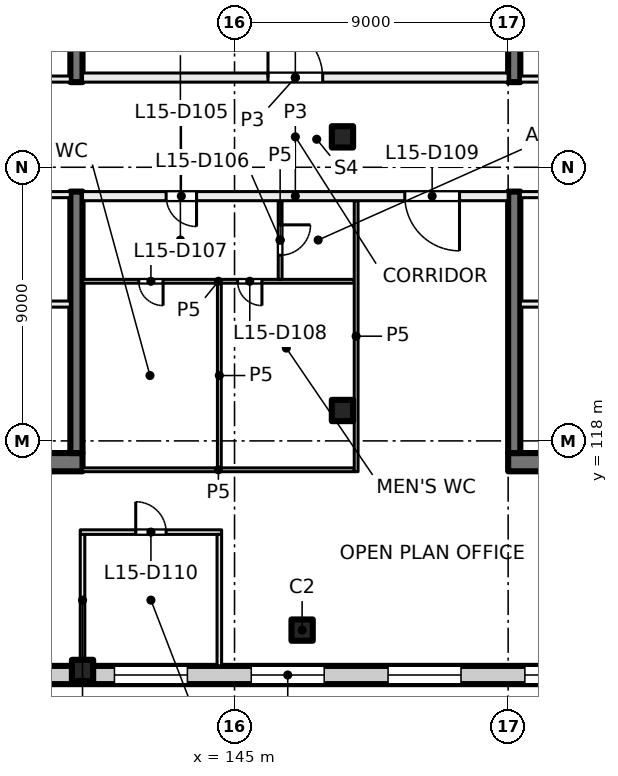
"""IFC4 building model, lengths in metres.
Left out: names, types, materials, properties, quantities, classifications, styles, units other than length and angle.
Written with IfcOpenShell. Run it as: python <this file> out.ifc"""

import sys

from ifc_helpers import new_model, si_unit, direction, frame, frame_2d, origin, origin_2d, place, context, subcontext, project, spatial, rectangle, extrude, element, fill, save


model = new_model("IFC4")
c1 = context("Model", 3, precision=1e-05, world=origin(), true_north=direction((0.0, 1.0)))
c2 = subcontext(c1, "Body", "Model", "MODEL_VIEW")
j1 = project(units=[si_unit("LENGTHUNIT", "METRE"), si_unit("PLANEANGLEUNIT", "RADIAN")], contexts=[c1])
p1 = place(None, origin())
s1 = spatial("IfcSite", under=j1, at=p1, CompositionType="ELEMENT")
p2 = place(p1, origin())
s2 = spatial("IfcBuilding", under=s1, at=p2, CompositionType="ELEMENT")
p3 = place(p2, frame((0.0, 0.0, 67.5)))
s3 = spatial("IfcBuildingStorey", under=s2, at=p3, CompositionType="ELEMENT", Elevation=67.5)
for number, where, z_axis, x_axis in (
    (1, (148.55, 119.0, 0.0), (0.0, 0.0, 1.0), (1.0, 0.0, 0.0)),
    (2, (148.55, 128.0, 0.0), (0.0, 0.0, 1.0), (1.0, 0.0, 0.0)),
    (3, (140.0, 110.45, 0.0), (0.0, 0.0, 1.0), (1.0, 0.0, 0.0)),
    (4, (147.223, 111.777, 0.0), (0.0, 0.0, 1.0), (1.0, 0.0, 0.0)),
):
    element("IfcColumn", number, at=place(p3, frame(where, z_axis=z_axis, x_axis=x_axis)), inside=s3, PredefinedType="COLUMN", context=c2, shape_type="SweptSolid", body=[
        extrude(rectangle(XDim=0.7, YDim=0.7, at=origin_2d()), origin(), (0.0, 0.0, 1.0), 4.0),
    ])
p4 = place(p3, frame((135.4, 117.3, 0.0), z_axis=(0.0, 0.0, 1.0), x_axis=(1.0, 0.0, 0.0)))
e5 = element("IfcWall", 5, at=p4, inside=s3, PredefinedType="SHEAR", context=c2, shape_type="SweptSolid", body=[
    extrude(rectangle(XDim=4.6, YDim=0.6, at=frame_2d((2.3, 0.0))), origin(), (0.0, 0.0, 1.0), 4.0),
])
for number, where, z_axis, x_axis in (
    (6, (139.8, 117.6, 0.0), (0.0, 0.0, 1.0), (0.0, 1.0, 0.0)),
    (7, (139.8, 129.8, 0.0), (0.0, 0.0, 1.0), (0.0, 1.0, 0.0)),
):
    element("IfcWall", number, at=place(p3, frame(where, z_axis=z_axis, x_axis=x_axis)), inside=s3, PredefinedType="SHEAR", context=c2, shape_type="SweptSolid", body=[
        extrude(rectangle(XDim=8.6, YDim=0.4, at=frame_2d((4.3, 0.0))), origin(), (0.0, 0.0, 1.0), 4.0),
    ])
p5 = place(p3, frame((158.6, 117.3, 0.0), z_axis=(0.0, 0.0, 1.0), x_axis=(-1.0, 0.0, 0.0)))
e8 = element("IfcWall", 8, at=p5, inside=s3, PredefinedType="SHEAR", context=c2, shape_type="SweptSolid", body=[
    extrude(rectangle(XDim=4.6, YDim=0.6, at=frame_2d((2.3, 0.0))), origin(), (0.0, 0.0, 1.0), 4.0),
])
for number, where, z_axis, x_axis in (
    (9, (154.2, 138.4, 0.0), (0.0, 0.0, 1.0), (0.0, -1.0, 0.0)),
    (10, (154.2, 126.2, 0.0), (0.0, 0.0, 1.0), (0.0, -1.0, 0.0)),
):
    element("IfcWall", number, at=place(p3, frame(where, z_axis=z_axis, x_axis=x_axis)), inside=s3, PredefinedType="SHEAR", context=c2, shape_type="SweptSolid", body=[
        extrude(rectangle(XDim=8.6, YDim=0.4, at=frame_2d((4.3, 0.0))), origin(), (0.0, 0.0, 1.0), 4.0),
    ])
p6 = place(p3, frame((162.93, 110.3, 0.0), z_axis=(0.0, 0.0, 1.0), x_axis=(-1.0, 0.0, 0.0)))
e11 = element("IfcWall", 11, at=p6, inside=s3, PredefinedType="SOLIDWALL", context=c2, shape_type="SweptSolid", body=[
    extrude(rectangle(XDim=31.93, YDim=0.6, at=frame_2d((15.965, 0.0))), origin(), (0.0, 0.0, 1.0), 3.625),
])
p7 = place(p6, frame((1.48, 0.0, 0.9)))
e12 = element("IfcOpeningElement", 12, at=p7, cuts=e11, PredefinedType="OPENING", context=c2, shape_type="SweptSolid", body=[
    extrude(rectangle(XDim=2.4, YDim=2.4, at=frame_2d((1.2, 1.2))), frame((0.0, 0.31, 0.0), z_axis=(0.0, -1.0, 0.0), x_axis=(1.0, 0.0, 0.0)), (0.0, 0.0, 1.0), 0.62),
])
p8 = place(p6, frame((5.98, 0.0, 0.9)))
e13 = element("IfcOpeningElement", 13, at=p8, cuts=e11, PredefinedType="OPENING", context=c2, shape_type="SweptSolid", body=[
    extrude(rectangle(XDim=2.4, YDim=2.4, at=frame_2d((1.2, 1.2))), frame((0.0, 0.31, 0.0), z_axis=(0.0, -1.0, 0.0), x_axis=(1.0, 0.0, 0.0)), (0.0, 0.0, 1.0), 0.62),
])
p9 = place(p6, frame((10.48, 0.0, 0.9)))
e14 = element("IfcOpeningElement", 14, at=p9, cuts=e11, PredefinedType="OPENING", context=c2, shape_type="SweptSolid", body=[
    extrude(rectangle(XDim=2.4, YDim=2.4, at=frame_2d((1.2, 1.2))), frame((0.0, 0.31, 0.0), z_axis=(0.0, -1.0, 0.0), x_axis=(1.0, 0.0, 0.0)), (0.0, 0.0, 1.0), 0.62),
])
p10 = place(p6, frame((14.98, 0.0, 0.9)))
e15 = element("IfcOpeningElement", 15, at=p10, cuts=e11, PredefinedType="OPENING", context=c2, shape_type="SweptSolid", body=[
    extrude(rectangle(XDim=2.4, YDim=2.4, at=frame_2d((1.2, 1.2))), frame((0.0, 0.31, 0.0), z_axis=(0.0, -1.0, 0.0), x_axis=(1.0, 0.0, 0.0)), (0.0, 0.0, 1.0), 0.62),
])
p11 = place(p6, frame((19.48, 0.0, 0.9)))
e16 = element("IfcOpeningElement", 16, at=p11, cuts=e11, PredefinedType="OPENING", context=c2, shape_type="SweptSolid", body=[
    extrude(rectangle(XDim=2.4, YDim=2.4, at=frame_2d((1.2, 1.2))), frame((0.0, 0.31, 0.0), z_axis=(0.0, -1.0, 0.0), x_axis=(1.0, 0.0, 0.0)), (0.0, 0.0, 1.0), 0.62),
])
p12 = place(p6, frame((23.98, 0.0, 0.9)))
e17 = element("IfcOpeningElement", 17, at=p12, cuts=e11, PredefinedType="OPENING", context=c2, shape_type="SweptSolid", body=[
    extrude(rectangle(XDim=2.4, YDim=2.4, at=frame_2d((1.2, 1.2))), frame((0.0, 0.31, 0.0), z_axis=(0.0, -1.0, 0.0), x_axis=(1.0, 0.0, 0.0)), (0.0, 0.0, 1.0), 0.62),
])
p13 = place(p6, frame((28.48, 0.0, 0.9)))
e18 = element("IfcOpeningElement", 18, at=p13, cuts=e11, PredefinedType="OPENING", context=c2, shape_type="SweptSolid", body=[
    extrude(rectangle(XDim=2.4, YDim=2.4, at=frame_2d((1.2, 1.2))), frame((0.0, 0.31, 0.0), z_axis=(0.0, -1.0, 0.0), x_axis=(1.0, 0.0, 0.0)), (0.0, 0.0, 1.0), 0.62),
])
p14 = place(p3, frame((135.0, 129.9, 0.0), z_axis=(0.0, 0.0, 1.0), x_axis=(1.0, 0.0, 0.0)))
e19 = element("IfcWall", 19, at=p14, inside=s3, PredefinedType="PARTITIONING", context=c2, shape_type="SweptSolid", body=[
    extrude(rectangle(XDim=4.6, YDim=0.2, at=frame_2d((2.3, 0.0))), origin(), (0.0, 0.0, 1.0), 3.625),
])
p15 = place(p14, frame((1.7, 0.0, 0.0)))
e20 = element("IfcOpeningElement", 20, at=p15, cuts=e19, PredefinedType="OPENING", context=c2, shape_type="SweptSolid", body=[
    extrude(rectangle(XDim=1.2, YDim=2.1, at=frame_2d((0.6, 1.05))), frame((0.0, 0.11, 0.0), z_axis=(0.0, -1.0, 0.0), x_axis=(1.0, 0.0, 0.0)), (0.0, 0.0, 1.0), 0.22),
])
p16 = place(p3, frame((139.6, 126.1, 0.0), z_axis=(0.0, 0.0, 1.0), x_axis=(-1.0, 0.0, 0.0)))
e21 = element("IfcWall", 21, at=p16, inside=s3, PredefinedType="PARTITIONING", context=c2, shape_type="SweptSolid", body=[
    extrude(rectangle(XDim=4.6, YDim=0.2, at=frame_2d((2.3, 0.0))), origin(), (0.0, 0.0, 1.0), 3.625),
])
p17 = place(p16, frame((1.7, 0.0, 0.0)))
e22 = element("IfcOpeningElement", 22, at=p17, cuts=e21, PredefinedType="OPENING", context=c2, shape_type="SweptSolid", body=[
    extrude(rectangle(XDim=1.2, YDim=2.1, at=frame_2d((0.6, 1.05))), frame((0.0, 0.11, 0.0), z_axis=(0.0, -1.0, 0.0), x_axis=(1.0, 0.0, 0.0)), (0.0, 0.0, 1.0), 0.22),
])
p18 = place(p3, frame((139.6, 122.5, 0.0), z_axis=(0.0, 0.0, 1.0), x_axis=(-1.0, 0.0, 0.0)))
e23 = element("IfcWall", 23, at=p18, inside=s3, PredefinedType="PARTITIONING", context=c2, shape_type="SweptSolid", body=[
    extrude(rectangle(XDim=4.6, YDim=0.2, at=frame_2d((2.3, 0.0))), origin(), (0.0, 0.0, 1.0), 3.625),
])
p19 = place(p18, frame((1.35, 0.0, 0.0)))
e24 = element("IfcOpeningElement", 24, at=p19, cuts=e23, PredefinedType="OPENING", context=c2, shape_type="SweptSolid", body=[
    extrude(rectangle(XDim=1.5, YDim=2.1, at=frame_2d((0.75, 1.05))), frame((0.0, 0.11, 0.0), z_axis=(0.0, -1.0, 0.0), x_axis=(1.0, 0.0, 0.0)), (0.0, 0.0, 1.0), 0.22),
])
p20 = place(p3, frame((163.8, 126.1, 0.0), z_axis=(0.0, 0.0, 1.0), x_axis=(-1.0, 0.0, 0.0)))
e25 = element("IfcWall", 25, at=p20, inside=s3, PredefinedType="PARTITIONING", context=c2, shape_type="SweptSolid", body=[
    extrude(rectangle(XDim=9.4, YDim=0.2, at=frame_2d((4.7, 0.0))), origin(), (0.0, 0.0, 1.0), 3.625),
])
p21 = place(p20, frame((4.1, 0.0, 0.0)))
e26 = element("IfcOpeningElement", 26, at=p21, cuts=e25, PredefinedType="OPENING", context=c2, shape_type="SweptSolid", body=[
    extrude(rectangle(XDim=1.2, YDim=2.1, at=frame_2d((0.6, 1.05))), frame((0.0, 0.11, 0.0), z_axis=(0.0, -1.0, 0.0), x_axis=(1.0, 0.0, 0.0)), (0.0, 0.0, 1.0), 0.22),
])
p22 = place(p3, frame((163.8, 122.5, 0.0), z_axis=(0.0, 0.0, 1.0), x_axis=(-1.0, 0.0, 0.0)))
e27 = element("IfcWall", 27, at=p22, inside=s3, PredefinedType="PARTITIONING", context=c2, shape_type="SweptSolid", body=[
    extrude(rectangle(XDim=9.4, YDim=0.2, at=frame_2d((4.7, 0.0))), origin(), (0.0, 0.0, 1.0), 3.625),
])
p23 = place(p22, frame((6.55, 0.0, 0.0)))
e28 = element("IfcOpeningElement", 28, at=p23, cuts=e27, PredefinedType="OPENING", context=c2, shape_type="SweptSolid", body=[
    extrude(rectangle(XDim=1.5, YDim=2.1, at=frame_2d((0.75, 1.05))), frame((0.0, 0.11, 0.0), z_axis=(0.0, -1.0, 0.0), x_axis=(1.0, 0.0, 0.0)), (0.0, 0.0, 1.0), 0.22),
])
p24 = place(p3, frame((154.4, 129.9, 0.0), z_axis=(0.0, 0.0, 1.0), x_axis=(1.0, 0.0, 0.0)))
e29 = element("IfcWall", 29, at=p24, inside=s3, PredefinedType="PARTITIONING", context=c2, shape_type="SweptSolid", body=[
    extrude(rectangle(XDim=9.4, YDim=0.2, at=frame_2d((4.7, 0.0))), origin(), (0.0, 0.0, 1.0), 3.625),
])
p25 = place(p24, frame((4.1, 0.0, 0.0)))
e30 = element("IfcOpeningElement", 30, at=p25, cuts=e29, PredefinedType="OPENING", context=c2, shape_type="SweptSolid", body=[
    extrude(rectangle(XDim=1.2, YDim=2.1, at=frame_2d((0.6, 1.05))), frame((0.0, 0.11, 0.0), z_axis=(0.0, -1.0, 0.0), x_axis=(1.0, 0.0, 0.0)), (0.0, 0.0, 1.0), 0.22),
])
p26 = place(p3, frame((140.0, 110.6, 0.0), z_axis=(0.0, 0.0, 1.0), x_axis=(0.0, 1.0, 0.0)))
e31 = element("IfcWall", 31, at=p26, inside=s3, PredefinedType="PARTITIONING", context=c2, shape_type="SweptSolid", body=[
    extrude(rectangle(XDim=4.325, YDim=0.15, at=frame_2d((2.163, 0.0))), origin(), (0.0, 0.0, 1.0), 3.625),
])
p27 = place(p3, frame((139.925, 115.0, 0.0), z_axis=(0.0, 0.0, 1.0), x_axis=(1.0, 0.0, 0.0)))
e32 = element("IfcWall", 32, at=p27, inside=s3, PredefinedType="PARTITIONING", context=c2, shape_type="SweptSolid", body=[
    extrude(rectangle(XDim=4.65, YDim=0.15, at=frame_2d((2.325, 0.0))), origin(), (0.0, 0.0, 1.0), 3.625),
])
p28 = place(p27, frame((1.825, 0.0, 0.0)))
e33 = element("IfcOpeningElement", 33, at=p28, cuts=e32, PredefinedType="OPENING", context=c2, shape_type="SweptSolid", body=[
    extrude(rectangle(XDim=1.0, YDim=2.1, at=frame_2d((0.5, 1.05))), frame((0.0, 0.085, 0.0), z_axis=(0.0, -1.0, 0.0), x_axis=(1.0, 0.0, 0.0)), (0.0, 0.0, 1.0), 0.17),
])
p29 = place(p3, frame((140.0, 117.05, 0.0), z_axis=(0.0, 0.0, 1.0), x_axis=(1.0, 0.0, 0.0)))
e34 = element("IfcWall", 34, at=p29, inside=s3, PredefinedType="PARTITIONING", context=c2, shape_type="SweptSolid", body=[
    extrude(rectangle(XDim=8.938, YDim=0.125, at=frame_2d((4.469, 0.0))), origin(), (0.0, 0.0, 1.0), 3.625),
])
p30 = place(p3, frame((148.938, 123.25, 0.0), z_axis=(0.0, 0.0, 1.0), x_axis=(-1.0, 0.0, 0.0)))
e35 = element("IfcWall", 35, at=p30, inside=s3, PredefinedType="PARTITIONING", context=c2, shape_type="SweptSolid", body=[
    extrude(rectangle(XDim=8.938, YDim=0.125, at=frame_2d((4.469, 0.0))), origin(), (0.0, 0.0, 1.0), 3.625),
])
p31 = place(p30, frame((6.288, 0.0, 0.0)))
e36 = element("IfcOpeningElement", 36, at=p31, cuts=e35, PredefinedType="OPENING", context=c2, shape_type="SweptSolid", body=[
    extrude(rectangle(XDim=0.8, YDim=2.1, at=frame_2d((0.4, 1.05))), frame((0.0, 0.073, 0.0), z_axis=(0.0, -1.0, 0.0), x_axis=(1.0, 0.0, 0.0)), (0.0, 0.0, 1.0), 0.145),
])
p32 = place(p30, frame((3.037, 0.0, 0.0)))
e37 = element("IfcOpeningElement", 37, at=p32, cuts=e35, PredefinedType="OPENING", context=c2, shape_type="SweptSolid", body=[
    extrude(rectangle(XDim=0.8, YDim=2.1, at=frame_2d((0.4, 1.05))), frame((0.0, 0.073, 0.0), z_axis=(0.0, -1.0, 0.0), x_axis=(1.0, 0.0, 0.0)), (0.0, 0.0, 1.0), 0.145),
])
p33 = place(p3, frame((140.0, 129.95, 0.0), z_axis=(0.0, 0.0, 1.0), x_axis=(1.0, 0.0, 0.0)))
e38 = element("IfcWall", 38, at=p33, inside=s3, PredefinedType="PARTITIONING", context=c2, shape_type="SweptSolid", body=[
    extrude(rectangle(XDim=14.0, YDim=0.3, at=frame_2d((7.0, 0.0))), origin(), (0.0, 0.0, 1.0), 3.625),
])
p34 = place(p33, frame((6.1, 0.0, 0.0)))
e39 = element("IfcOpeningElement", 39, at=p34, cuts=e38, PredefinedType="OPENING", context=c2, shape_type="SweptSolid", body=[
    extrude(rectangle(XDim=1.8, YDim=2.1, at=frame_2d((0.9, 1.05))), frame((0.0, 0.16, 0.0), z_axis=(0.0, -1.0, 0.0), x_axis=(1.0, 0.0, 0.0)), (0.0, 0.0, 1.0), 0.32),
])
p35 = place(p3, frame((144.5, 114.925, 0.0), z_axis=(0.0, 0.0, 1.0), x_axis=(0.0, -1.0, 0.0)))
e40 = element("IfcWall", 40, at=p35, inside=s3, PredefinedType="PARTITIONING", context=c2, shape_type="SweptSolid", body=[
    extrude(rectangle(XDim=4.325, YDim=0.15, at=frame_2d((2.163, 0.0))), origin(), (0.0, 0.0, 1.0), 3.625),
])
p36 = place(p3, frame((144.5, 117.112, 0.0), z_axis=(0.0, 0.0, 1.0), x_axis=(0.0, 1.0, 0.0)))
e41 = element("IfcWall", 41, at=p36, inside=s3, PredefinedType="PARTITIONING", context=c2, shape_type="SweptSolid", body=[
    extrude(rectangle(XDim=6.076, YDim=0.125, at=frame_2d((3.038, 0.0))), origin(), (0.0, 0.0, 1.0), 3.625),
])
p37 = place(p3, frame((146.5, 125.9, 0.0), z_axis=(0.0, 0.0, 1.0), x_axis=(0.0, -1.0, 0.0)))
e42 = element("IfcWall", 42, at=p37, inside=s3, PredefinedType="PARTITIONING", context=c2, shape_type="SweptSolid", body=[
    extrude(rectangle(XDim=2.588, YDim=0.125, at=frame_2d((1.294, 0.0))), origin(), (0.0, 0.0, 1.0), 3.625),
])
p38 = place(p37, frame((0.794, 0.0, 0.0)))
e43 = element("IfcOpeningElement", 43, at=p38, cuts=e42, PredefinedType="OPENING", context=c2, shape_type="SweptSolid", body=[
    extrude(rectangle(XDim=1.0, YDim=2.1, at=frame_2d((0.5, 1.05))), frame((0.0, 0.073, 0.0), z_axis=(0.0, -1.0, 0.0), x_axis=(1.0, 0.0, 0.0)), (0.0, 0.0, 1.0), 0.145),
])
p39 = place(p3, frame((149.0, 116.988, 0.0), z_axis=(0.0, 0.0, 1.0), x_axis=(0.0, 1.0, 0.0)))
e44 = element("IfcWall", 44, at=p39, inside=s3, PredefinedType="PARTITIONING", context=c2, shape_type="SweptSolid", body=[
    extrude(rectangle(XDim=8.912, YDim=0.125, at=frame_2d((4.456, 0.0))), origin(), (0.0, 0.0, 1.0), 3.625),
])
p40 = place(p3, frame((154.0, 126.05, 0.0), z_axis=(0.0, 0.0, 1.0), x_axis=(-1.0, 0.0, 0.0)))
e45 = element("IfcWall", 45, at=p40, inside=s3, PredefinedType="PARTITIONING", context=c2, shape_type="SweptSolid", body=[
    extrude(rectangle(XDim=14.0, YDim=0.3, at=frame_2d((7.0, 0.0))), origin(), (0.0, 0.0, 1.0), 3.625),
])
p41 = place(p40, frame((10.25, 0.0, 0.0)))
e46 = element("IfcOpeningElement", 46, at=p41, cuts=e45, PredefinedType="OPENING", context=c2, shape_type="SweptSolid", body=[
    extrude(rectangle(XDim=1.0, YDim=2.1, at=frame_2d((0.5, 1.05))), frame((0.0, 0.16, 0.0), z_axis=(0.0, -1.0, 0.0), x_axis=(1.0, 0.0, 0.0)), (0.0, 0.0, 1.0), 0.32),
])
p42 = place(p40, frame((1.6, 0.0, 0.0)))
e47 = element("IfcOpeningElement", 47, at=p42, cuts=e45, PredefinedType="OPENING", context=c2, shape_type="SweptSolid", body=[
    extrude(rectangle(XDim=1.8, YDim=2.1, at=frame_2d((0.9, 1.05))), frame((0.0, 0.16, 0.0), z_axis=(0.0, -1.0, 0.0), x_axis=(1.0, 0.0, 0.0)), (0.0, 0.0, 1.0), 0.32),
])
p43 = place(p8, origin())
e48 = element("IfcWindow", 48, at=p43, inside=s3, PartitioningType="SINGLE_PANEL", PredefinedType="WINDOW", context=c2, shape_type="SweptSolid", body=[
    extrude(rectangle(XDim=2.4, YDim=2.4, at=frame_2d((1.2, 1.2))), frame((0.0, 0.03, 0.0), z_axis=(0.0, -1.0, 0.0), x_axis=(1.0, 0.0, 0.0)), (0.0, 0.0, 1.0), 0.06),
])
fill(e13, e48)
p44 = place(p9, origin())
e49 = element("IfcWindow", 49, at=p44, inside=s3, PartitioningType="SINGLE_PANEL", PredefinedType="WINDOW", context=c2, shape_type="SweptSolid", body=[
    extrude(rectangle(XDim=2.4, YDim=2.4, at=frame_2d((1.2, 1.2))), frame((0.0, 0.03, 0.0), z_axis=(0.0, -1.0, 0.0), x_axis=(1.0, 0.0, 0.0)), (0.0, 0.0, 1.0), 0.06),
])
fill(e14, e49)
p45 = place(p10, origin())
e50 = element("IfcWindow", 50, at=p45, inside=s3, PartitioningType="SINGLE_PANEL", PredefinedType="WINDOW", context=c2, shape_type="SweptSolid", body=[
    extrude(rectangle(XDim=2.4, YDim=2.4, at=frame_2d((1.2, 1.2))), frame((0.0, 0.03, 0.0), z_axis=(0.0, -1.0, 0.0), x_axis=(1.0, 0.0, 0.0)), (0.0, 0.0, 1.0), 0.06),
])
fill(e15, e50)
p46 = place(p11, origin())
e51 = element("IfcWindow", 51, at=p46, inside=s3, PartitioningType="SINGLE_PANEL", PredefinedType="WINDOW", context=c2, shape_type="SweptSolid", body=[
    extrude(rectangle(XDim=2.4, YDim=2.4, at=frame_2d((1.2, 1.2))), frame((0.0, 0.03, 0.0), z_axis=(0.0, -1.0, 0.0), x_axis=(1.0, 0.0, 0.0)), (0.0, 0.0, 1.0), 0.06),
])
fill(e16, e51)
p47 = place(p34, origin())
e52 = element("IfcDoor", 52, at=p47, inside=s3, OperationType="DOUBLE_DOOR_SINGLE_SWING", PredefinedType="DOOR", context=c2, shape_type="SweptSolid", body=[
    extrude(rectangle(XDim=1.8, YDim=2.1, at=frame_2d((0.9, 1.05))), frame((0.0, 0.025, 0.0), z_axis=(0.0, -1.0, 0.0), x_axis=(1.0, 0.0, 0.0)), (0.0, 0.0, 1.0), 0.05),
])
fill(e39, e52)
p48 = place(p41, origin())
e53 = element("IfcDoor", 53, at=p48, inside=s3, OperationType="SINGLE_SWING_RIGHT", PredefinedType="DOOR", context=c2, shape_type="SweptSolid", body=[
    extrude(rectangle(XDim=1.0, YDim=2.1, at=frame_2d((0.5, 1.05))), frame((0.0, 0.025, 0.0), z_axis=(0.0, -1.0, 0.0), x_axis=(1.0, 0.0, 0.0)), (0.0, 0.0, 1.0), 0.05),
])
fill(e46, e53)
p49 = place(p38, origin())
e54 = element("IfcDoor", 54, at=p49, inside=s3, OperationType="SINGLE_SWING_RIGHT", PredefinedType="DOOR", context=c2, shape_type="SweptSolid", body=[
    extrude(rectangle(XDim=1.0, YDim=2.1, at=frame_2d((0.5, 1.05))), frame((0.0, 0.025, 0.0), z_axis=(0.0, -1.0, 0.0), x_axis=(1.0, 0.0, 0.0)), (0.0, 0.0, 1.0), 0.05),
])
fill(e43, e54)
p50 = place(p31, origin())
e55 = element("IfcDoor", 55, at=p50, inside=s3, OperationType="SINGLE_SWING_RIGHT", PredefinedType="DOOR", context=c2, shape_type="SweptSolid", body=[
    extrude(rectangle(XDim=0.8, YDim=2.1, at=frame_2d((0.4, 1.05))), frame((0.0, 0.025, 0.0), z_axis=(0.0, -1.0, 0.0), x_axis=(1.0, 0.0, 0.0)), (0.0, 0.0, 1.0), 0.05),
])
fill(e36, e55)
p51 = place(p32, origin())
e56 = element("IfcDoor", 56, at=p51, inside=s3, OperationType="SINGLE_SWING_LEFT", PredefinedType="DOOR", context=c2, shape_type="SweptSolid", body=[
    extrude(rectangle(XDim=0.8, YDim=2.1, at=frame_2d((0.4, 1.05))), frame((0.0, 0.025, 0.0), z_axis=(0.0, -1.0, 0.0), x_axis=(1.0, 0.0, 0.0)), (0.0, 0.0, 1.0), 0.05),
])
fill(e37, e56)
p52 = place(p42, origin())
e57 = element("IfcDoor", 57, at=p52, inside=s3, OperationType="DOUBLE_DOOR_SINGLE_SWING", PredefinedType="DOOR", context=c2, shape_type="SweptSolid", body=[
    extrude(rectangle(XDim=1.8, YDim=2.1, at=frame_2d((0.9, 1.05))), frame((0.0, 0.025, 0.0), z_axis=(0.0, -1.0, 0.0), x_axis=(1.0, 0.0, 0.0)), (0.0, 0.0, 1.0), 0.05),
])
fill(e47, e57)
p53 = place(p28, origin())
e58 = element("IfcDoor", 58, at=p53, inside=s3, OperationType="SINGLE_SWING_LEFT", PredefinedType="DOOR", context=c2, shape_type="SweptSolid", body=[
    extrude(rectangle(XDim=1.0, YDim=2.1, at=frame_2d((0.5, 1.05))), frame((0.0, 0.025, 0.0), z_axis=(0.0, -1.0, 0.0), x_axis=(1.0, 0.0, 0.0)), (0.0, 0.0, 1.0), 0.05),
])
fill(e33, e58)
save(model, sys.argv[1])
